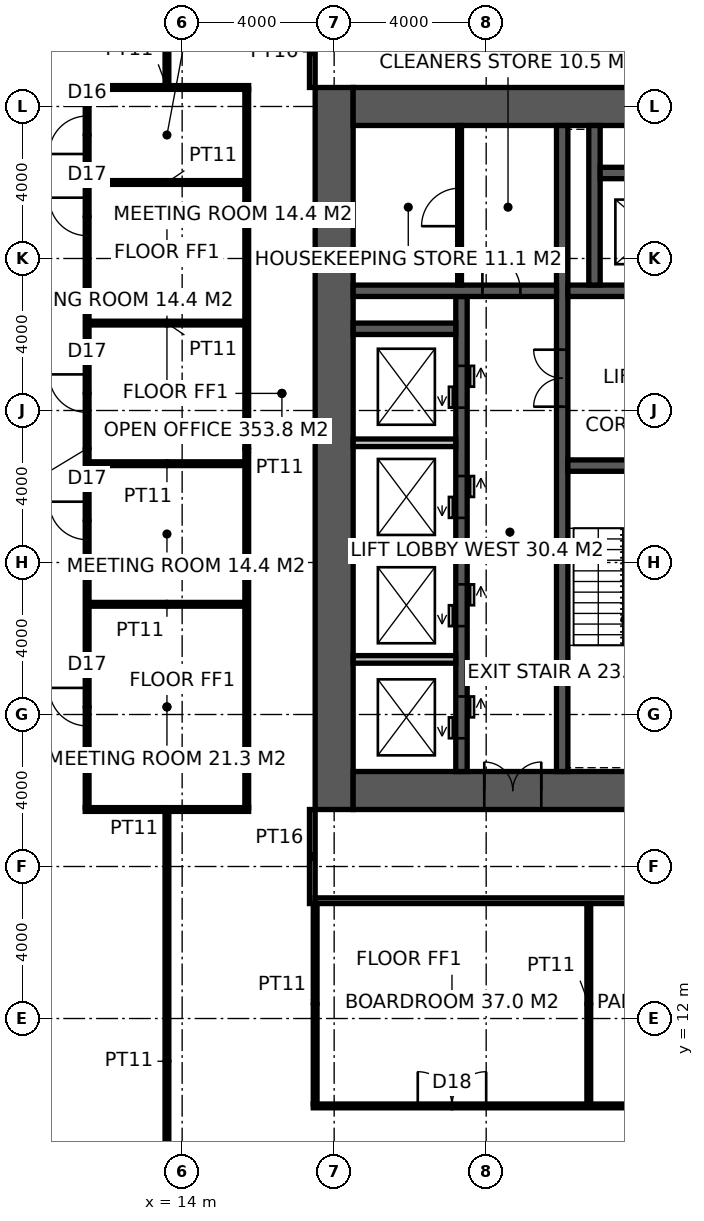
"""IFC4 building model, lengths in metres.
Left out: names, types, materials, properties, quantities, classifications, styles, units other than length and angle.
Written with IfcOpenShell. Run it as: python <this file> out.ifc"""

import sys

from ifc_helpers import new_model, si_unit, direction, frame, frame_2d, origin, place, context, subcontext, project, spatial, rectangle, extrude, element, fill, save


model = new_model("IFC4")
c1 = context("Model", 3, precision=1e-05, world=origin(), true_north=direction((0.0, 1.0)))
c2 = subcontext(c1, "Body", "Model", "MODEL_VIEW")
j1 = project(units=[si_unit("LENGTHUNIT", "METRE"), si_unit("PLANEANGLEUNIT", "RADIAN")], contexts=[c1])
p1 = place(None, origin())
s1 = spatial("IfcSite", under=j1, at=p1, CompositionType="ELEMENT")
p2 = place(p1, origin())
s2 = spatial("IfcBuilding", under=s1, at=p2, CompositionType="ELEMENT")
p3 = place(p2, frame((0.0, 0.0, 167.8)))
s3 = spatial("IfcBuildingStorey", under=s2, at=p3, CompositionType="ELEMENT", Elevation=167.8)
p4 = place(p3, frame((18.0, 17.5, -0.15), z_axis=(0.0, 0.0, 1.0), x_axis=(0.0, 1.0, 0.0)))
e1 = element("IfcWall", 1, at=p4, inside=s3, PredefinedType="SHEAR", context=c2, shape_type="SweptSolid", body=[
    extrude(rectangle(XDim=19.0, YDim=1.0, at=frame_2d((9.5, 0.0))), origin(), (0.0, 0.0, 1.0), 4.0),
])
p5 = place(p3, frame((18.5, 18.0, -0.15), z_axis=(0.0, 0.0, 1.0), x_axis=(1.0, 0.0, 0.0)))
e2 = element("IfcWall", 2, at=p5, inside=s3, PredefinedType="SHEAR", context=c2, shape_type="SweptSolid", body=[
    extrude(rectangle(XDim=17.6, YDim=1.0, at=frame_2d((8.8, 0.0))), origin(), (0.0, 0.0, 1.0), 4.0),
])
p6 = place(p5, frame((3.45, 0.0, 0.15)))
e3 = element("IfcOpeningElement", 3, at=p6, cuts=e2, PredefinedType="OPENING", context=c2, shape_type="SweptSolid", body=[
    extrude(rectangle(XDim=1.5, YDim=2.4, at=frame_2d((0.75, 1.2))), frame((0.0, 0.51, 0.0), z_axis=(0.0, -1.0, 0.0), x_axis=(1.0, 0.0, 0.0)), (0.0, 0.0, 1.0), 1.02),
])
p7 = place(p3, frame((18.5, 36.0, -0.15), z_axis=(0.0, 0.0, 1.0), x_axis=(1.0, 0.0, 0.0)))
e4 = element("IfcWall", 4, at=p7, inside=s3, PredefinedType="SHEAR", context=c2, shape_type="SweptSolid", body=[
    extrude(rectangle(XDim=17.6, YDim=1.0, at=frame_2d((8.8, 0.0))), origin(), (0.0, 0.0, 1.0), 4.0),
])
p8 = place(p3, frame((24.0, 18.5, -0.15), z_axis=(0.0, 0.0, 1.0), x_axis=(0.0, 1.0, 0.0)))
e5 = element("IfcWall", 5, at=p8, inside=s3, PredefinedType="SHEAR", context=c2, shape_type="SweptSolid", body=[
    extrude(rectangle(XDim=17.0, YDim=0.3, at=frame_2d((8.5, 0.0))), origin(), (0.0, 0.0, 1.0), 4.0),
])
p9 = place(p8, frame((9.6, 0.0, 0.15)))
e6 = element("IfcOpeningElement", 6, at=p9, cuts=e5, PredefinedType="OPENING", context=c2, shape_type="SweptSolid", body=[
    extrude(rectangle(XDim=1.5, YDim=2.4, at=frame_2d((0.75, 1.2))), frame((0.0, 0.16, 0.0), z_axis=(0.0, -1.0, 0.0), x_axis=(1.0, 0.0, 0.0)), (0.0, 0.0, 1.0), 0.32),
])
p10 = place(p3, frame((24.15, 26.55, -0.15), z_axis=(0.0, 0.0, 1.0), x_axis=(1.0, 0.0, 0.0)))
e7 = element("IfcWall", 7, at=p10, inside=s3, PredefinedType="SHEAR", context=c2, shape_type="SweptSolid", body=[
    extrude(rectangle(XDim=11.25, YDim=0.3, at=frame_2d((5.625, 0.0))), origin(), (0.0, 0.0, 1.0), 4.0),
])
p11 = place(p10, frame((9.25, 0.0, 0.15)))
e8 = element("IfcOpeningElement", 8, at=p11, cuts=e7, PredefinedType="OPENING", context=c2, shape_type="SweptSolid", body=[
    extrude(rectangle(XDim=1.0, YDim=2.2, at=frame_2d((0.5, 1.1))), frame((0.0, 0.16, 0.0), z_axis=(0.0, -1.0, 0.0), x_axis=(1.0, 0.0, 0.0)), (0.0, 0.0, 1.0), 0.32),
])
p12 = place(p10, frame((4.9, 0.0, 0.15)))
e9 = element("IfcOpeningElement", 9, at=p12, cuts=e7, PredefinedType="OPENING", context=c2, shape_type="SweptSolid", body=[
    extrude(rectangle(XDim=1.5, YDim=2.4, at=frame_2d((0.75, 1.2))), frame((0.0, 0.16, 0.0), z_axis=(0.0, -1.0, 0.0), x_axis=(1.0, 0.0, 0.0)), (0.0, 0.0, 1.0), 0.32),
])
p13 = place(p3, frame((24.15, 31.15, -0.15), z_axis=(0.0, 0.0, 1.0), x_axis=(1.0, 0.0, 0.0)))
e10 = element("IfcWall", 10, at=p13, inside=s3, PredefinedType="SHEAR", context=c2, shape_type="SweptSolid", body=[
    extrude(rectangle(XDim=11.25, YDim=0.3, at=frame_2d((5.625, 0.0))), origin(), (0.0, 0.0, 1.0), 4.0),
])
p14 = place(p13, frame((7.25, 0.0, 0.15)))
e11 = element("IfcOpeningElement", 11, at=p14, cuts=e10, PredefinedType="OPENING", context=c2, shape_type="SweptSolid", body=[
    extrude(rectangle(XDim=1.4, YDim=2.4, at=frame_2d((0.7, 1.2))), frame((0.0, 0.16, 0.0), z_axis=(0.0, -1.0, 0.0), x_axis=(1.0, 0.0, 0.0)), (0.0, 0.0, 1.0), 0.32),
])
p15 = place(p3, frame((21.35, 18.5, -0.15), z_axis=(0.0, 0.0, 1.0), x_axis=(0.0, 1.0, 0.0)))
e12 = element("IfcWall", 12, at=p15, inside=s3, PredefinedType="SHEAR", context=c2, shape_type="SweptSolid", body=[
    extrude(rectangle(XDim=12.5, YDim=0.3, at=frame_2d((6.25, 0.0))), origin(), (0.0, 0.0, 1.0), 4.0),
])
p16 = place(p15, frame((0.875, 0.0, 0.15)))
e13 = element("IfcOpeningElement", 13, at=p16, cuts=e12, PredefinedType="OPENING", context=c2, shape_type="SweptSolid", body=[
    extrude(rectangle(XDim=1.1, YDim=2.2, at=frame_2d((0.55, 1.1))), frame((0.0, 0.16, 0.0), z_axis=(0.0, -1.0, 0.0), x_axis=(1.0, 0.0, 0.0)), (0.0, 0.0, 1.0), 0.32),
])
p17 = place(p15, frame((3.825, 0.0, 0.15)))
e14 = element("IfcOpeningElement", 14, at=p17, cuts=e12, PredefinedType="OPENING", context=c2, shape_type="SweptSolid", body=[
    extrude(rectangle(XDim=1.1, YDim=2.2, at=frame_2d((0.55, 1.1))), frame((0.0, 0.16, 0.0), z_axis=(0.0, -1.0, 0.0), x_axis=(1.0, 0.0, 0.0)), (0.0, 0.0, 1.0), 0.32),
])
p18 = place(p15, frame((6.675, 0.0, 0.15)))
e15 = element("IfcOpeningElement", 15, at=p18, cuts=e12, PredefinedType="OPENING", context=c2, shape_type="SweptSolid", body=[
    extrude(rectangle(XDim=1.1, YDim=2.2, at=frame_2d((0.55, 1.1))), frame((0.0, 0.16, 0.0), z_axis=(0.0, -1.0, 0.0), x_axis=(1.0, 0.0, 0.0)), (0.0, 0.0, 1.0), 0.32),
])
p19 = place(p15, frame((9.575, 0.0, 0.15)))
e16 = element("IfcOpeningElement", 16, at=p19, cuts=e12, PredefinedType="OPENING", context=c2, shape_type="SweptSolid", body=[
    extrude(rectangle(XDim=1.1, YDim=2.2, at=frame_2d((0.55, 1.1))), frame((0.0, 0.16, 0.0), z_axis=(0.0, -1.0, 0.0), x_axis=(1.0, 0.0, 0.0)), (0.0, 0.0, 1.0), 0.32),
])
p20 = place(p3, frame((18.5, 31.15, -0.15), z_axis=(0.0, 0.0, 1.0), x_axis=(1.0, 0.0, 0.0)))
e17 = element("IfcWall", 17, at=p20, inside=s3, PredefinedType="SHEAR", context=c2, shape_type="SweptSolid", body=[
    extrude(rectangle(XDim=5.35, YDim=0.3, at=frame_2d((2.675, 0.0))), origin(), (0.0, 0.0, 1.0), 4.0),
])
p21 = place(p20, frame((3.4, 0.0, 0.15)))
e18 = element("IfcOpeningElement", 18, at=p21, cuts=e17, PredefinedType="OPENING", context=c2, shape_type="SweptSolid", body=[
    extrude(rectangle(XDim=1.0, YDim=2.2, at=frame_2d((0.5, 1.1))), frame((0.0, 0.16, 0.0), z_axis=(0.0, -1.0, 0.0), x_axis=(1.0, 0.0, 0.0)), (0.0, 0.0, 1.0), 0.32),
])
p22 = place(p3, frame((18.5, 30.15, -0.15), z_axis=(0.0, 0.0, 1.0), x_axis=(1.0, 0.0, 0.0)))
e19 = element("IfcWall", 19, at=p22, inside=s3, PredefinedType="SHEAR", context=c2, shape_type="SweptSolid", body=[
    extrude(rectangle(XDim=2.7, YDim=0.3, at=frame_2d((1.35, 0.0))), origin(), (0.0, 0.0, 1.0), 4.0),
])
p23 = place(p3, frame((24.85, 31.3, -0.15), z_axis=(0.0, 0.0, 1.0), x_axis=(0.0, 1.0, 0.0)))
e20 = element("IfcWall", 20, at=p23, inside=s3, PredefinedType="SHEAR", context=c2, shape_type="SweptSolid", body=[
    extrude(rectangle(XDim=4.2, YDim=0.3, at=frame_2d((2.1, 0.0))), origin(), (0.0, 0.0, 1.0), 4.0),
])
p24 = place(p3, frame((25.0, 34.25, -0.15), z_axis=(0.0, 0.0, 1.0), x_axis=(1.0, 0.0, 0.0)))
e21 = element("IfcWall", 21, at=p24, inside=s3, PredefinedType="SHEAR", context=c2, shape_type="SweptSolid", body=[
    extrude(rectangle(XDim=8.6, YDim=0.3, at=frame_2d((4.3, 0.0))), origin(), (0.0, 0.0, 1.0), 4.0),
])
for number, where, z_axis, x_axis in (
    (22, (18.5, 21.45, -0.15), (0.0, 0.0, 1.0), (1.0, 0.0, 0.0)),
    (23, (18.5, 24.3, -0.15), (0.0, 0.0, 1.0), (1.0, 0.0, 0.0)),
    (24, (18.5, 27.15, -0.15), (0.0, 0.0, 1.0), (1.0, 0.0, 0.0)),
):
    element("IfcWall", number, at=place(p3, frame(where, z_axis=z_axis, x_axis=x_axis)), inside=s3, PredefinedType="SOLIDWALL", context=c2, shape_type="SweptSolid", body=[
        extrude(rectangle(XDim=2.7, YDim=0.2, at=frame_2d((1.35, 0.0))), origin(), (0.0, 0.0, 1.0), 4.0),
    ])
p25 = place(p3, frame((21.3, 31.3, 0.0), z_axis=(0.0, 0.0, 1.0), x_axis=(0.0, 1.0, 0.0)))
e25 = element("IfcWall", 25, at=p25, inside=s3, PredefinedType="PARTITIONING", context=c2, shape_type="SweptSolid", body=[
    extrude(rectangle(XDim=4.2, YDim=0.1, at=frame_2d((2.1, 0.0))), origin(), (0.0, 0.0, 1.0), 3.85),
])
p26 = place(p25, frame((1.55, 0.0, 0.0)))
e26 = element("IfcOpeningElement", 26, at=p26, cuts=e25, PredefinedType="OPENING", context=c2, shape_type="SweptSolid", body=[
    extrude(rectangle(XDim=1.0, YDim=2.2, at=frame_2d((0.5, 1.1))), frame((0.0, 0.06, 0.0), z_axis=(0.0, -1.0, 0.0), x_axis=(1.0, 0.0, 0.0)), (0.0, 0.0, 1.0), 0.12),
])
p27 = place(p3, frame((17.425, 15.025, 0.0), z_axis=(0.0, 0.0, 1.0), x_axis=(0.0, 1.0, 0.0)))
e27 = element("IfcWall", 27, at=p27, inside=s3, PredefinedType="PARTITIONING", context=c2, shape_type="SweptSolid", body=[
    extrude(rectangle(XDim=2.475, YDim=0.15, at=frame_2d((1.238, 0.0))), origin(), (0.0, 0.0, 1.0), 2.65),
])
p28 = place(p3, frame((17.425, 36.5, 0.0), z_axis=(0.0, 0.0, 1.0), x_axis=(0.0, 1.0, 0.0)))
e28 = element("IfcWall", 28, at=p28, inside=s3, PredefinedType="PARTITIONING", context=c2, shape_type="SweptSolid", body=[
    extrude(rectangle(XDim=1.875, YDim=0.15, at=frame_2d((0.938, 0.0))), origin(), (0.0, 0.0, 1.0), 2.65),
])
p29 = place(p3, frame((17.5, 15.1, 0.0), z_axis=(0.0, 0.0, 1.0), x_axis=(1.0, 0.0, 0.0)))
e29 = element("IfcWall", 29, at=p29, inside=s3, PredefinedType="PARTITIONING", context=c2, shape_type="SweptSolid", body=[
    extrude(rectangle(XDim=20.325, YDim=0.15, at=frame_2d((10.163, 0.0))), origin(), (0.0, 0.0, 1.0), 3.85),
])
p30 = place(p3, frame((17.45, 9.7, 0.0), z_axis=(0.0, 0.0, 1.0), x_axis=(1.0, 0.0, 0.0)))
e30 = element("IfcWall", 30, at=p30, inside=s3, PredefinedType="PARTITIONING", context=c2, shape_type="SweptSolid", body=[
    extrude(rectangle(XDim=17.65, YDim=0.1, at=frame_2d((8.825, 0.0))), origin(), (0.0, 0.0, 1.0), 3.85),
])
p31 = place(p30, frame((2.75, 0.0, 0.0)))
e31 = element("IfcOpeningElement", 31, at=p31, cuts=e30, PredefinedType="OPENING", context=c2, shape_type="SweptSolid", body=[
    extrude(rectangle(XDim=1.8, YDim=2.4, at=frame_2d((0.9, 1.2))), frame((0.0, 0.06, 0.0), z_axis=(0.0, -1.0, 0.0), x_axis=(1.0, 0.0, 0.0)), (0.0, 0.0, 1.0), 0.12),
])
p32 = place(p30, frame((9.05, 0.0, 0.0)))
e32 = element("IfcOpeningElement", 32, at=p32, cuts=e30, PredefinedType="OPENING", context=c2, shape_type="SweptSolid", body=[
    extrude(rectangle(XDim=1.0, YDim=2.2, at=frame_2d((0.5, 1.1))), frame((0.0, 0.06, 0.0), z_axis=(0.0, -1.0, 0.0), x_axis=(1.0, 0.0, 0.0)), (0.0, 0.0, 1.0), 0.12),
])
p33 = place(p30, frame((12.675, 0.0, 0.0)))
e33 = element("IfcOpeningElement", 33, at=p33, cuts=e30, PredefinedType="OPENING", context=c2, shape_type="SweptSolid", body=[
    extrude(rectangle(XDim=1.0, YDim=2.2, at=frame_2d((0.5, 1.1))), frame((0.0, 0.06, 0.0), z_axis=(0.0, -1.0, 0.0), x_axis=(1.0, 0.0, 0.0)), (0.0, 0.0, 1.0), 0.12),
])
p34 = place(p30, frame((15.55, 0.0, 0.0)))
e34 = element("IfcOpeningElement", 34, at=p34, cuts=e30, PredefinedType="OPENING", context=c2, shape_type="SweptSolid", body=[
    extrude(rectangle(XDim=1.0, YDim=2.2, at=frame_2d((0.5, 1.1))), frame((0.0, 0.06, 0.0), z_axis=(0.0, -1.0, 0.0), x_axis=(1.0, 0.0, 0.0)), (0.0, 0.0, 1.0), 0.12),
])
p35 = place(p3, frame((11.45, 17.5, 0.0), z_axis=(0.0, 0.0, 1.0), x_axis=(1.0, 0.0, 0.0)))
e35 = element("IfcWall", 35, at=p35, inside=s3, PredefinedType="PARTITIONING", context=c2, shape_type="SweptSolid", body=[
    extrude(rectangle(XDim=4.3, YDim=0.1, at=frame_2d((2.15, 0.0))), origin(), (0.0, 0.0, 1.0), 3.85),
])
for number, where, z_axis, x_axis in (
    (36, (11.55, 22.9, 0.0), (0.0, 0.0, 1.0), (1.0, 0.0, 0.0)),
    (37, (11.55, 26.6, 0.0), (0.0, 0.0, 1.0), (1.0, 0.0, 0.0)),
    (38, (11.55, 30.3, 0.0), (0.0, 0.0, 1.0), (1.0, 0.0, 0.0)),
    (39, (11.55, 34.0, 0.0), (0.0, 0.0, 1.0), (1.0, 0.0, 0.0)),
):
    element("IfcWall", number, at=place(p3, frame(where, z_axis=z_axis, x_axis=x_axis)), inside=s3, PredefinedType="PARTITIONING", context=c2, shape_type="SweptSolid", body=[
        extrude(rectangle(XDim=4.1, YDim=0.1, at=frame_2d((2.05, 0.0))), origin(), (0.0, 0.0, 1.0), 3.85),
    ])
p36 = place(p3, frame((11.45, 36.5, 0.0), z_axis=(0.0, 0.0, 1.0), x_axis=(1.0, 0.0, 0.0)))
e40 = element("IfcWall", 40, at=p36, inside=s3, PredefinedType="PARTITIONING", context=c2, shape_type="SweptSolid", body=[
    extrude(rectangle(XDim=4.3, YDim=0.1, at=frame_2d((2.15, 0.0))), origin(), (0.0, 0.0, 1.0), 2.85),
])
p37 = place(p3, frame((11.5, 17.55, 0.0), z_axis=(0.0, 0.0, 1.0), x_axis=(0.0, 1.0, 0.0)))
e41 = element("IfcWall", 41, at=p37, inside=s3, PredefinedType="PARTITIONING", context=c2, shape_type="SweptSolid", body=[
    extrude(rectangle(XDim=18.9, YDim=0.1, at=frame_2d((9.45, 0.0))), origin(), (0.0, 0.0, 1.0), 3.85),
])
p38 = place(p37, frame((2.15, 0.0, 0.0)))
e42 = element("IfcOpeningElement", 42, at=p38, cuts=e41, PredefinedType="OPENING", context=c2, shape_type="SweptSolid", body=[
    extrude(rectangle(XDim=1.0, YDim=2.2, at=frame_2d((0.5, 1.1))), frame((0.0, 0.06, 0.0), z_axis=(0.0, -1.0, 0.0), x_axis=(1.0, 0.0, 0.0)), (0.0, 0.0, 1.0), 0.12),
])
p39 = place(p37, frame((7.05, 0.0, 0.0)))
e43 = element("IfcOpeningElement", 43, at=p39, cuts=e41, PredefinedType="OPENING", context=c2, shape_type="SweptSolid", body=[
    extrude(rectangle(XDim=1.0, YDim=2.2, at=frame_2d((0.5, 1.1))), frame((0.0, 0.06, 0.0), z_axis=(0.0, -1.0, 0.0), x_axis=(1.0, 0.0, 0.0)), (0.0, 0.0, 1.0), 0.12),
])
p40 = place(p37, frame((10.4, 0.0, 0.0)))
e44 = element("IfcOpeningElement", 44, at=p40, cuts=e41, PredefinedType="OPENING", context=c2, shape_type="SweptSolid", body=[
    extrude(rectangle(XDim=1.0, YDim=2.2, at=frame_2d((0.5, 1.1))), frame((0.0, 0.06, 0.0), z_axis=(0.0, -1.0, 0.0), x_axis=(1.0, 0.0, 0.0)), (0.0, 0.0, 1.0), 0.12),
])
p41 = place(p37, frame((15.05, 0.0, 0.0)))
e45 = element("IfcOpeningElement", 45, at=p41, cuts=e41, PredefinedType="OPENING", context=c2, shape_type="SweptSolid", body=[
    extrude(rectangle(XDim=1.0, YDim=2.2, at=frame_2d((0.5, 1.1))), frame((0.0, 0.06, 0.0), z_axis=(0.0, -1.0, 0.0), x_axis=(1.0, 0.0, 0.0)), (0.0, 0.0, 1.0), 0.12),
])
p42 = place(p37, frame((17.2, 0.0, 0.0)))
e46 = element("IfcOpeningElement", 46, at=p42, cuts=e41, PredefinedType="OPENING", context=c2, shape_type="SweptSolid", body=[
    extrude(rectangle(XDim=1.0, YDim=2.2, at=frame_2d((0.5, 1.1))), frame((0.0, 0.06, 0.0), z_axis=(0.0, -1.0, 0.0), x_axis=(1.0, 0.0, 0.0)), (0.0, 0.0, 1.0), 0.12),
])
p43 = place(p3, frame((15.7, 17.55, 0.0), z_axis=(0.0, 0.0, 1.0), x_axis=(0.0, 1.0, 0.0)))
e47 = element("IfcWall", 47, at=p43, inside=s3, PredefinedType="PARTITIONING", context=c2, shape_type="SweptSolid", body=[
    extrude(rectangle(XDim=18.9, YDim=0.1, at=frame_2d((9.45, 0.0))), origin(), (0.0, 0.0, 1.0), 3.85),
])
p44 = place(p3, frame((17.5, 9.75, 0.0), z_axis=(0.0, 0.0, 1.0), x_axis=(0.0, 1.0, 0.0)))
e48 = element("IfcWall", 48, at=p44, inside=s3, PredefinedType="PARTITIONING", context=c2, shape_type="SweptSolid", body=[
    extrude(rectangle(XDim=5.275, YDim=0.1, at=frame_2d((2.637, 0.0))), origin(), (0.0, 0.0, 1.0), 2.65),
])
p45 = place(p3, frame((24.7, 9.75, 0.0), z_axis=(0.0, 0.0, 1.0), x_axis=(0.0, 1.0, 0.0)))
e49 = element("IfcWall", 49, at=p45, inside=s3, PredefinedType="PARTITIONING", context=c2, shape_type="SweptSolid", body=[
    extrude(rectangle(XDim=5.275, YDim=0.1, at=frame_2d((2.637, 0.0))), origin(), (0.0, 0.0, 1.0), 3.85),
])
p46 = place(p3, frame((13.6, 4.3, 0.0), z_axis=(0.0, 0.0, 1.0), x_axis=(0.0, 1.0, 0.0)))
e50 = element("IfcWall", 50, at=p46, inside=s3, PredefinedType="PARTITIONING", context=c2, shape_type="SweptSolid", body=[
    extrude(rectangle(XDim=13.15, YDim=0.1, at=frame_2d((6.575, 0.0))), origin(), (0.0, 0.0, 1.0), 2.65),
])
p47 = place(p3, frame((13.6, 36.55, 0.0), z_axis=(0.0, 0.0, 1.0), x_axis=(0.0, 1.0, 0.0)))
e51 = element("IfcWall", 51, at=p47, inside=s3, PredefinedType="PARTITIONING", context=c2, shape_type="SweptSolid", body=[
    extrude(rectangle(XDim=15.15, YDim=0.1, at=frame_2d((7.575, 0.0))), origin(), (0.0, 0.0, 1.0), 2.65),
])
p48 = place(p47, frame((7.075, 0.0, 0.0)))
e52 = element("IfcOpeningElement", 52, at=p48, cuts=e51, PredefinedType="OPENING", context=c2, shape_type="SweptSolid", body=[
    extrude(rectangle(XDim=1.0, YDim=2.2, at=frame_2d((0.5, 1.1))), frame((0.0, 0.06, 0.0), z_axis=(0.0, -1.0, 0.0), x_axis=(1.0, 0.0, 0.0)), (0.0, 0.0, 1.0), 0.12),
])
p49 = place(p9, origin())
e53 = element("IfcDoor", 53, at=p49, inside=s3, OperationType="DOUBLE_DOOR_DOUBLE_SWING", PredefinedType="DOOR", context=c2, shape_type="SweptSolid", body=[
    extrude(rectangle(XDim=1.5, YDim=2.4, at=frame_2d((0.75, 1.2))), frame((0.0, 0.025, 0.0), z_axis=(0.0, -1.0, 0.0), x_axis=(1.0, 0.0, 0.0)), (0.0, 0.0, 1.0), 0.05),
])
fill(e6, e53)
p50 = place(p21, origin())
e54 = element("IfcDoor", 54, at=p50, inside=s3, OperationType="SINGLE_SWING_LEFT", PredefinedType="DOOR", context=c2, shape_type="SweptSolid", body=[
    extrude(rectangle(XDim=1.0, YDim=2.2, at=frame_2d((0.5, 1.1))), frame((0.0, 0.025, 0.0), z_axis=(0.0, -1.0, 0.0), x_axis=(1.0, 0.0, 0.0)), (0.0, 0.0, 1.0), 0.05),
])
fill(e18, e54)
p51 = place(p26, origin())
e55 = element("IfcDoor", 55, at=p51, inside=s3, OperationType="SINGLE_SWING_LEFT", PredefinedType="DOOR", context=c2, shape_type="SweptSolid", body=[
    extrude(rectangle(XDim=1.0, YDim=2.2, at=frame_2d((0.5, 1.1))), frame((0.0, 0.025, 0.0), z_axis=(0.0, -1.0, 0.0), x_axis=(1.0, 0.0, 0.0)), (0.0, 0.0, 1.0), 0.05),
])
fill(e26, e55)
p52 = place(p6, origin())
e56 = element("IfcDoor", 56, at=p52, inside=s3, OperationType="DOUBLE_DOOR_DOUBLE_SWING", PredefinedType="DOOR", context=c2, shape_type="SweptSolid", body=[
    extrude(rectangle(XDim=1.5, YDim=2.4, at=frame_2d((0.75, 1.2))), frame((0.0, 0.025, 0.0), z_axis=(0.0, -1.0, 0.0), x_axis=(1.0, 0.0, 0.0)), (0.0, 0.0, 1.0), 0.05),
])
fill(e3, e56)
p53 = place(p31, origin())
e57 = element("IfcDoor", 57, at=p53, inside=s3, OperationType="DOUBLE_DOOR_DOUBLE_SWING", PredefinedType="DOOR", context=c2, shape_type="SweptSolid", body=[
    extrude(rectangle(XDim=1.8, YDim=2.4, at=frame_2d((0.9, 1.2))), frame((0.0, 0.025, 0.0), z_axis=(0.0, -1.0, 0.0), x_axis=(1.0, 0.0, 0.0)), (0.0, 0.0, 1.0), 0.05),
])
fill(e31, e57)
p54 = place(p38, origin())
e58 = element("IfcDoor", 58, at=p54, inside=s3, OperationType="SINGLE_SWING_RIGHT", PredefinedType="DOOR", context=c2, shape_type="SweptSolid", body=[
    extrude(rectangle(XDim=1.0, YDim=2.2, at=frame_2d((0.5, 1.1))), frame((0.0, 0.025, 0.0), z_axis=(0.0, -1.0, 0.0), x_axis=(1.0, 0.0, 0.0)), (0.0, 0.0, 1.0), 0.05),
])
fill(e42, e58)
p55 = place(p39, origin())
e59 = element("IfcDoor", 59, at=p55, inside=s3, OperationType="SINGLE_SWING_RIGHT", PredefinedType="DOOR", context=c2, shape_type="SweptSolid", body=[
    extrude(rectangle(XDim=1.0, YDim=2.2, at=frame_2d((0.5, 1.1))), frame((0.0, 0.025, 0.0), z_axis=(0.0, -1.0, 0.0), x_axis=(1.0, 0.0, 0.0)), (0.0, 0.0, 1.0), 0.05),
])
fill(e43, e59)
p56 = place(p40, origin())
e60 = element("IfcDoor", 60, at=p56, inside=s3, OperationType="SINGLE_SWING_RIGHT", PredefinedType="DOOR", context=c2, shape_type="SweptSolid", body=[
    extrude(rectangle(XDim=1.0, YDim=2.2, at=frame_2d((0.5, 1.1))), frame((0.0, 0.025, 0.0), z_axis=(0.0, -1.0, 0.0), x_axis=(1.0, 0.0, 0.0)), (0.0, 0.0, 1.0), 0.05),
])
fill(e44, e60)
p57 = place(p41, origin())
e61 = element("IfcDoor", 61, at=p57, inside=s3, OperationType="SINGLE_SWING_RIGHT", PredefinedType="DOOR", context=c2, shape_type="SweptSolid", body=[
    extrude(rectangle(XDim=1.0, YDim=2.2, at=frame_2d((0.5, 1.1))), frame((0.0, 0.025, 0.0), z_axis=(0.0, -1.0, 0.0), x_axis=(1.0, 0.0, 0.0)), (0.0, 0.0, 1.0), 0.05),
])
fill(e45, e61)
p58 = place(p42, origin())
e62 = element("IfcDoor", 62, at=p58, inside=s3, OperationType="SINGLE_SWING_LEFT", PredefinedType="DOOR", context=c2, shape_type="SweptSolid", body=[
    extrude(rectangle(XDim=1.0, YDim=2.2, at=frame_2d((0.5, 1.1))), frame((0.0, 0.025, 0.0), z_axis=(0.0, -1.0, 0.0), x_axis=(1.0, 0.0, 0.0)), (0.0, 0.0, 1.0), 0.05),
])
fill(e46, e62)
p59 = place(p16, origin())
e63 = element("IfcDoor", 63, at=p59, inside=s3, OperationType="DOUBLE_DOOR_SLIDING", PredefinedType="DOOR", context=c2, shape_type="SweptSolid", body=[
    extrude(rectangle(XDim=1.1, YDim=2.2, at=frame_2d((0.55, 1.1))), frame((0.0, 0.025, 0.0), z_axis=(0.0, -1.0, 0.0), x_axis=(1.0, 0.0, 0.0)), (0.0, 0.0, 1.0), 0.05),
])
fill(e13, e63)
p60 = place(p17, origin())
e64 = element("IfcDoor", 64, at=p60, inside=s3, OperationType="DOUBLE_DOOR_SLIDING", PredefinedType="DOOR", context=c2, shape_type="SweptSolid", body=[
    extrude(rectangle(XDim=1.1, YDim=2.2, at=frame_2d((0.55, 1.1))), frame((0.0, 0.025, 0.0), z_axis=(0.0, -1.0, 0.0), x_axis=(1.0, 0.0, 0.0)), (0.0, 0.0, 1.0), 0.05),
])
fill(e14, e64)
p61 = place(p18, origin())
e65 = element("IfcDoor", 65, at=p61, inside=s3, OperationType="DOUBLE_DOOR_SLIDING", PredefinedType="DOOR", context=c2, shape_type="SweptSolid", body=[
    extrude(rectangle(XDim=1.1, YDim=2.2, at=frame_2d((0.55, 1.1))), frame((0.0, 0.025, 0.0), z_axis=(0.0, -1.0, 0.0), x_axis=(1.0, 0.0, 0.0)), (0.0, 0.0, 1.0), 0.05),
])
fill(e15, e65)
p62 = place(p19, origin())
e66 = element("IfcDoor", 66, at=p62, inside=s3, OperationType="DOUBLE_DOOR_SLIDING", PredefinedType="DOOR", context=c2, shape_type="SweptSolid", body=[
    extrude(rectangle(XDim=1.1, YDim=2.2, at=frame_2d((0.55, 1.1))), frame((0.0, 0.025, 0.0), z_axis=(0.0, -1.0, 0.0), x_axis=(1.0, 0.0, 0.0)), (0.0, 0.0, 1.0), 0.05),
])
fill(e16, e66)
save(model, sys.argv[1])
